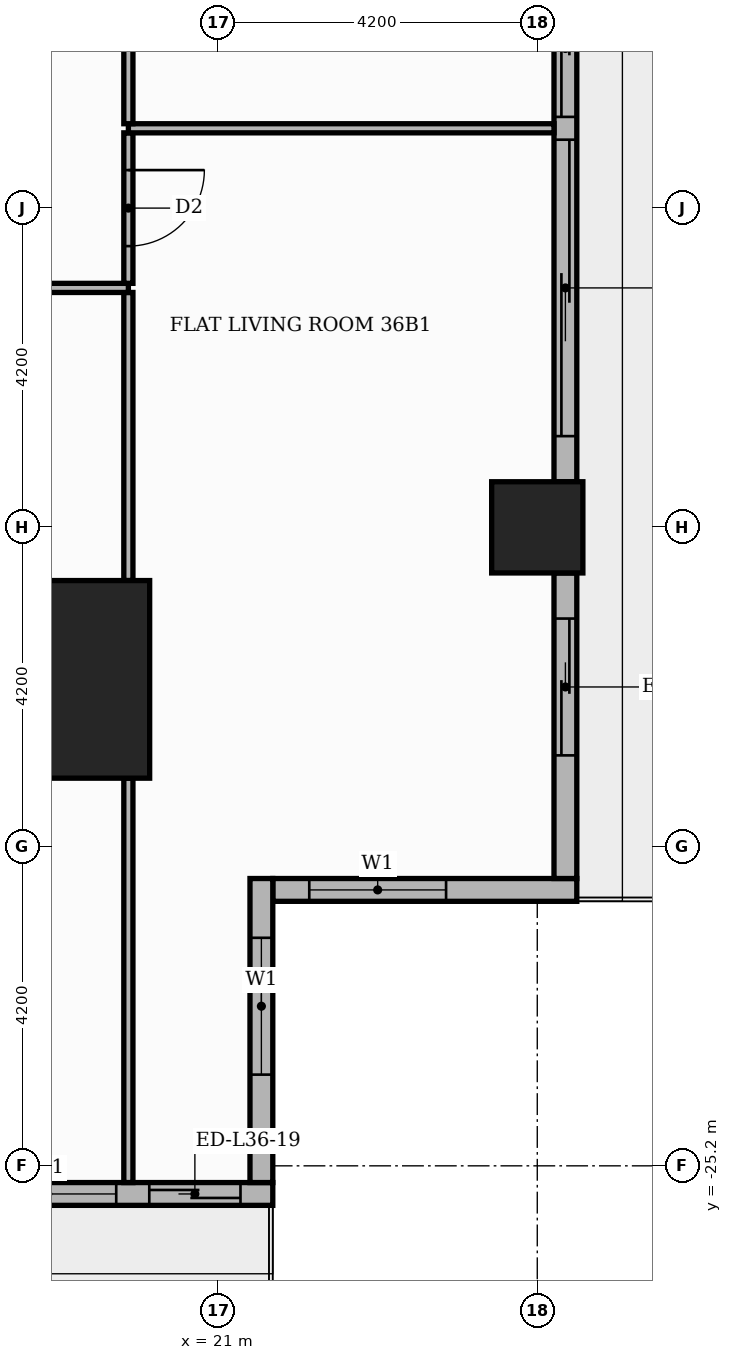
"""IFC4 building model, lengths in metres.
Left out: names, types, materials, properties, quantities, classifications, styles, units other than length and angle.
Written with IfcOpenShell. Run it as: python <this file> out.ifc"""

import sys

from ifc_helpers import new_model, si_unit, direction, frame, frame_2d, origin, origin_2d, place, context, subcontext, project, spatial, rectangle, extrude, element, fill, save


model = new_model("IFC4")
c1 = context("Model", 3, precision=1e-05, world=origin(), true_north=direction((0.0, 1.0)))
c2 = subcontext(c1, "Body", "Model", "MODEL_VIEW")
j1 = project(units=[si_unit("LENGTHUNIT", "METRE"), si_unit("PLANEANGLEUNIT", "RADIAN")], contexts=[c1])
p1 = place(None, origin())
s1 = spatial("IfcSite", under=j1, at=p1, CompositionType="ELEMENT")
p2 = place(p1, origin())
s2 = spatial("IfcBuilding", under=s1, at=p2, CompositionType="ELEMENT")
p3 = place(p2, frame((0.0, 0.0, 153.3)))
s3 = spatial("IfcBuildingStorey", under=s2, at=p3, CompositionType="ELEMENT", Elevation=153.3)
p4 = place(p3, frame((18.8, -18.8, 0.0), z_axis=(0.0, 0.0, 1.0), x_axis=(1.0, 0.0, 0.0)))
e1 = element("IfcColumn", 1, at=p4, inside=s3, PredefinedType="COLUMN", context=c2, shape_type="SweptSolid", body=[
    extrude(rectangle(XDim=2.6, YDim=2.6, at=origin_2d()), origin(), (0.0, 0.0, 1.0), 3.9),
])
p5 = place(p3, frame((25.2, -16.8, 0.0), z_axis=(0.0, 0.0, 1.0), x_axis=(1.0, 0.0, 0.0)))
e2 = element("IfcColumn", 2, at=p5, inside=s3, PredefinedType="COLUMN", context=c2, shape_type="SweptSolid", body=[
    extrude(rectangle(XDim=1.2, YDim=1.2, at=origin_2d()), origin(), (0.0, 0.0, 1.0), 3.9),
])
p6 = place(p3, frame((21.72, -21.57, 0.0), z_axis=(0.0, 0.0, 1.0), x_axis=(1.0, 0.0, 0.0)))
e3 = element("IfcWall", 3, at=p6, inside=s3, PredefinedType="STANDARD", context=c2, shape_type="SweptSolid", body=[
    extrude(rectangle(XDim=4.0, YDim=0.3, at=frame_2d((2.0, 0.0))), origin(), (0.0, 0.0, 1.0), 3.48),
])
p7 = place(p6, frame((0.48, 0.0, 0.9)))
e4 = element("IfcOpeningElement", 4, at=p7, cuts=e3, PredefinedType="OPENING", context=c2, shape_type="SweptSolid", body=[
    extrude(rectangle(XDim=1.8, YDim=2.1, at=frame_2d((0.9, 1.05))), frame((0.0, 0.16, 0.0), z_axis=(0.0, -1.0, 0.0), x_axis=(1.0, 0.0, 0.0)), (0.0, 0.0, 1.0), 0.32),
])
p8 = place(p3, frame((25.57, -21.42, 0.0), z_axis=(0.0, 0.0, 1.0), x_axis=(0.0, 1.0, 0.0)))
e5 = element("IfcWall", 5, at=p8, inside=s3, PredefinedType="STANDARD", context=c2, shape_type="SweptSolid", body=[
    extrude(rectangle(XDim=4.02, YDim=0.3, at=frame_2d((2.01, 0.0))), origin(), (0.0, 0.0, 1.0), 3.48),
])
p9 = place(p8, frame((1.62, 0.0, 0.0)))
e6 = element("IfcOpeningElement", 6, at=p9, cuts=e5, PredefinedType="OPENING", context=c2, shape_type="SweptSolid", body=[
    extrude(rectangle(XDim=1.8, YDim=2.4, at=frame_2d((0.9, 1.2))), frame((0.0, 0.16, 0.0), z_axis=(0.0, -1.0, 0.0), x_axis=(1.0, 0.0, 0.0)), (0.0, 0.0, 1.0), 0.32),
])
p10 = place(p3, frame((25.57, -16.2, 0.0), z_axis=(0.0, 0.0, 1.0), x_axis=(0.0, 1.0, 0.0)))
e7 = element("IfcWall", 7, at=p10, inside=s3, PredefinedType="STANDARD", context=c2, shape_type="SweptSolid", body=[
    extrude(rectangle(XDim=7.2, YDim=0.3, at=frame_2d((3.6, 0.0))), origin(), (0.0, 0.0, 1.0), 3.48),
])
p11 = place(p10, frame((0.6, 0.0, 0.0)))
e8 = element("IfcOpeningElement", 8, at=p11, cuts=e7, PredefinedType="OPENING", context=c2, shape_type="SweptSolid", body=[
    extrude(rectangle(XDim=3.9, YDim=2.4, at=frame_2d((1.95, 1.2))), frame((0.0, 0.16, 0.0), z_axis=(0.0, -1.0, 0.0), x_axis=(1.0, 0.0, 0.0)), (0.0, 0.0, 1.0), 0.32),
])
p12 = place(p10, frame((4.8, 0.0, 0.0)))
e9 = element("IfcOpeningElement", 9, at=p12, cuts=e7, PredefinedType="OPENING", context=c2, shape_type="SweptSolid", body=[
    extrude(rectangle(XDim=1.8, YDim=2.4, at=frame_2d((0.9, 1.2))), frame((0.0, 0.16, 0.0), z_axis=(0.0, -1.0, 0.0), x_axis=(1.0, 0.0, 0.0)), (0.0, 0.0, 1.0), 0.32),
])
p13 = place(p3, frame((17.4, -25.57, 0.0), z_axis=(0.0, 0.0, 1.0), x_axis=(1.0, 0.0, 0.0)))
e10 = element("IfcWall", 10, at=p13, inside=s3, PredefinedType="STANDARD", context=c2, shape_type="SweptSolid", body=[
    extrude(rectangle(XDim=4.32, YDim=0.3, at=frame_2d((2.16, 0.0))), origin(), (0.0, 0.0, 1.0), 3.48),
])
p14 = place(p13, frame((2.695, 0.0, 0.0)))
e11 = element("IfcOpeningElement", 11, at=p14, cuts=e10, PredefinedType="OPENING", context=c2, shape_type="SweptSolid", body=[
    extrude(rectangle(XDim=1.2, YDim=2.4, at=frame_2d((0.6, 1.2))), frame((0.0, 0.16, 0.0), z_axis=(0.0, -1.0, 0.0), x_axis=(1.0, 0.0, 0.0)), (0.0, 0.0, 1.0), 0.32),
])
p15 = place(p13, frame((0.46, 0.0, 0.9)))
e12 = element("IfcOpeningElement", 12, at=p15, cuts=e10, PredefinedType="OPENING", context=c2, shape_type="SweptSolid", body=[
    extrude(rectangle(XDim=1.8, YDim=2.1, at=frame_2d((0.9, 1.05))), frame((0.0, 0.16, 0.0), z_axis=(0.0, -1.0, 0.0), x_axis=(1.0, 0.0, 0.0)), (0.0, 0.0, 1.0), 0.32),
])
p16 = place(p3, frame((21.57, -25.42, 0.0), z_axis=(0.0, 0.0, 1.0), x_axis=(0.0, 1.0, 0.0)))
e13 = element("IfcWall", 13, at=p16, inside=s3, PredefinedType="STANDARD", context=c2, shape_type="SweptSolid", body=[
    extrude(rectangle(XDim=4.0, YDim=0.3, at=frame_2d((2.0, 0.0))), origin(), (0.0, 0.0, 1.0), 3.48),
])
p17 = place(p16, frame((1.42, 0.0, 0.9)))
e14 = element("IfcOpeningElement", 14, at=p17, cuts=e13, PredefinedType="OPENING", context=c2, shape_type="SweptSolid", body=[
    extrude(rectangle(XDim=1.8, YDim=2.1, at=frame_2d((0.9, 1.05))), frame((0.0, 0.16, 0.0), z_axis=(0.0, -1.0, 0.0), x_axis=(1.0, 0.0, 0.0)), (0.0, 0.0, 1.0), 0.32),
])
p18 = place(p3, frame((19.82, -25.42, 0.0), z_axis=(0.0, 0.0, 1.0), x_axis=(0.0, 1.0, 0.0)))
e15 = element("IfcWall", 15, at=p18, inside=s3, PredefinedType="PARTITIONING", context=c2, shape_type="SweptSolid", body=[
    extrude(rectangle(XDim=5.32, YDim=0.12, at=frame_2d((2.66, 0.0))), origin(), (0.0, 0.0, 1.0), 3.48),
])
p19 = place(p3, frame((19.82, -17.5, 0.0), z_axis=(0.0, 0.0, 1.0), x_axis=(0.0, 1.0, 0.0)))
e16 = element("IfcWall", 16, at=p19, inside=s3, PredefinedType="PARTITIONING", context=c2, shape_type="SweptSolid", body=[
    extrude(rectangle(XDim=3.79, YDim=0.12, at=frame_2d((1.895, 0.0))), origin(), (0.0, 0.0, 1.0), 3.48),
])
p20 = place(p3, frame((13.65, -13.65, 0.0), z_axis=(0.0, 0.0, 1.0), x_axis=(1.0, 0.0, 0.0)))
e17 = element("IfcWall", 17, at=p20, inside=s3, PredefinedType="PARTITIONING", context=c2, shape_type="SweptSolid", body=[
    extrude(rectangle(XDim=6.17, YDim=0.12, at=frame_2d((3.085, 0.0))), origin(), (0.0, 0.0, 1.0), 3.48),
])
p21 = place(p20, frame((2.635, 0.0, 0.0)))
e18 = element("IfcOpeningElement", 18, at=p21, cuts=e17, PredefinedType="OPENING", context=c2, shape_type="SweptSolid", body=[
    extrude(rectangle(XDim=0.9, YDim=2.1, at=frame_2d((0.45, 1.05))), frame((0.0, 0.07, 0.0), z_axis=(0.0, -1.0, 0.0), x_axis=(1.0, 0.0, 0.0)), (0.0, 0.0, 1.0), 0.14),
])
p22 = place(p3, frame((19.82, -13.59, 0.0), z_axis=(0.0, 0.0, 1.0), x_axis=(0.0, 1.0, 0.0)))
e19 = element("IfcWall", 19, at=p22, inside=s3, PredefinedType="PARTITIONING", context=c2, shape_type="SweptSolid", body=[
    extrude(rectangle(XDim=1.98, YDim=0.12, at=frame_2d((0.99, 0.0))), origin(), (0.0, 0.0, 1.0), 3.48),
])
p23 = place(p22, frame((0.49, 0.0, 0.0)))
e20 = element("IfcOpeningElement", 20, at=p23, cuts=e19, PredefinedType="OPENING", context=c2, shape_type="SweptSolid", body=[
    extrude(rectangle(XDim=1.0, YDim=2.1, at=frame_2d((0.5, 1.05))), frame((0.0, 0.07, 0.0), z_axis=(0.0, -1.0, 0.0), x_axis=(1.0, 0.0, 0.0)), (0.0, 0.0, 1.0), 0.14),
])
p24 = place(p3, frame((19.82, -11.55, 0.0), z_axis=(0.0, 0.0, 1.0), x_axis=(1.0, 0.0, 0.0)))
e21 = element("IfcWall", 21, at=p24, inside=s3, PredefinedType="PARTITIONING", context=c2, shape_type="SweptSolid", body=[
    extrude(rectangle(XDim=5.6, YDim=0.12, at=frame_2d((2.8, 0.0))), origin(), (0.0, 0.0, 1.0), 3.48),
])
p25 = place(p3, frame((19.82, -11.49, 0.0), z_axis=(0.0, 0.0, 1.0), x_axis=(0.0, 1.0, 0.0)))
e22 = element("IfcWall", 22, at=p25, inside=s3, PredefinedType="PARTITIONING", context=c2, shape_type="SweptSolid", body=[
    extrude(rectangle(XDim=6.18, YDim=0.12, at=frame_2d((3.09, 0.0))), origin(), (0.0, 0.0, 1.0), 3.48),
])
p26 = place(p25, frame((2.64, 0.0, 0.0)))
e23 = element("IfcOpeningElement", 23, at=p26, cuts=e22, PredefinedType="OPENING", context=c2, shape_type="SweptSolid", body=[
    extrude(rectangle(XDim=0.9, YDim=2.1, at=frame_2d((0.45, 1.05))), frame((0.0, 0.07, 0.0), z_axis=(0.0, -1.0, 0.0), x_axis=(1.0, 0.0, 0.0)), (0.0, 0.0, 1.0), 0.14),
])
p27 = place(p7, origin())
e24 = element("IfcWindow", 24, at=p27, inside=s3, PartitioningType="SINGLE_PANEL", PredefinedType="WINDOW", context=c2, shape_type="SweptSolid", body=[
    extrude(rectangle(XDim=1.8, YDim=2.1, at=frame_2d((0.9, 1.05))), frame((0.0, 0.03, 0.0), z_axis=(0.0, -1.0, 0.0), x_axis=(1.0, 0.0, 0.0)), (0.0, 0.0, 1.0), 0.06),
])
fill(e4, e24)
p28 = place(p9, origin())
e25 = element("IfcDoor", 25, at=p28, inside=s3, OperationType="SLIDING_TO_RIGHT", PredefinedType="DOOR", context=c2, shape_type="SweptSolid", body=[
    extrude(rectangle(XDim=1.8, YDim=2.4, at=frame_2d((0.9, 1.2))), frame((0.0, 0.025, 0.0), z_axis=(0.0, -1.0, 0.0), x_axis=(1.0, 0.0, 0.0)), (0.0, 0.0, 1.0), 0.05),
])
fill(e6, e25)
p29 = place(p11, origin())
e26 = element("IfcDoor", 26, at=p29, inside=s3, OperationType="SLIDING_TO_LEFT", PredefinedType="DOOR", context=c2, shape_type="SweptSolid", body=[
    extrude(rectangle(XDim=3.9, YDim=2.4, at=frame_2d((1.95, 1.2))), frame((0.0, 0.025, 0.0), z_axis=(0.0, -1.0, 0.0), x_axis=(1.0, 0.0, 0.0)), (0.0, 0.0, 1.0), 0.05),
])
fill(e8, e26)
p30 = place(p12, origin())
e27 = element("IfcDoor", 27, at=p30, inside=s3, OperationType="SLIDING_TO_RIGHT", PredefinedType="DOOR", context=c2, shape_type="SweptSolid", body=[
    extrude(rectangle(XDim=1.8, YDim=2.4, at=frame_2d((0.9, 1.2))), frame((0.0, 0.025, 0.0), z_axis=(0.0, -1.0, 0.0), x_axis=(1.0, 0.0, 0.0)), (0.0, 0.0, 1.0), 0.05),
])
fill(e9, e27)
p31 = place(p14, origin())
e28 = element("IfcDoor", 28, at=p31, inside=s3, OperationType="SLIDING_TO_LEFT", PredefinedType="DOOR", context=c2, shape_type="SweptSolid", body=[
    extrude(rectangle(XDim=1.2, YDim=2.4, at=frame_2d((0.6, 1.2))), frame((0.0, 0.025, 0.0), z_axis=(0.0, -1.0, 0.0), x_axis=(1.0, 0.0, 0.0)), (0.0, 0.0, 1.0), 0.05),
])
fill(e11, e28)
p32 = place(p15, origin())
e29 = element("IfcWindow", 29, at=p32, inside=s3, PartitioningType="SINGLE_PANEL", PredefinedType="WINDOW", context=c2, shape_type="SweptSolid", body=[
    extrude(rectangle(XDim=1.8, YDim=2.1, at=frame_2d((0.9, 1.05))), frame((0.0, 0.03, 0.0), z_axis=(0.0, -1.0, 0.0), x_axis=(1.0, 0.0, 0.0)), (0.0, 0.0, 1.0), 0.06),
])
fill(e12, e29)
p33 = place(p17, origin())
e30 = element("IfcWindow", 30, at=p33, inside=s3, PartitioningType="SINGLE_PANEL", PredefinedType="WINDOW", context=c2, shape_type="SweptSolid", body=[
    extrude(rectangle(XDim=1.8, YDim=2.1, at=frame_2d((0.9, 1.05))), frame((0.0, 0.03, 0.0), z_axis=(0.0, -1.0, 0.0), x_axis=(1.0, 0.0, 0.0)), (0.0, 0.0, 1.0), 0.06),
])
fill(e14, e30)
p34 = place(p23, frame((1.0, 0.0, 0.0), z_axis=(0.0, 0.0, 1.0), x_axis=(-1.0, 0.0, 0.0)))
e31 = element("IfcDoor", 31, at=p34, inside=s3, OperationType="SINGLE_SWING_RIGHT", PredefinedType="DOOR", context=c2, shape_type="SweptSolid", body=[
    extrude(rectangle(XDim=1.0, YDim=2.1, at=frame_2d((0.5, 1.05))), frame((0.0, 0.025, 0.0), z_axis=(0.0, -1.0, 0.0), x_axis=(1.0, 0.0, 0.0)), (0.0, 0.0, 1.0), 0.05),
])
fill(e20, e31)
save(model, sys.argv[1])
